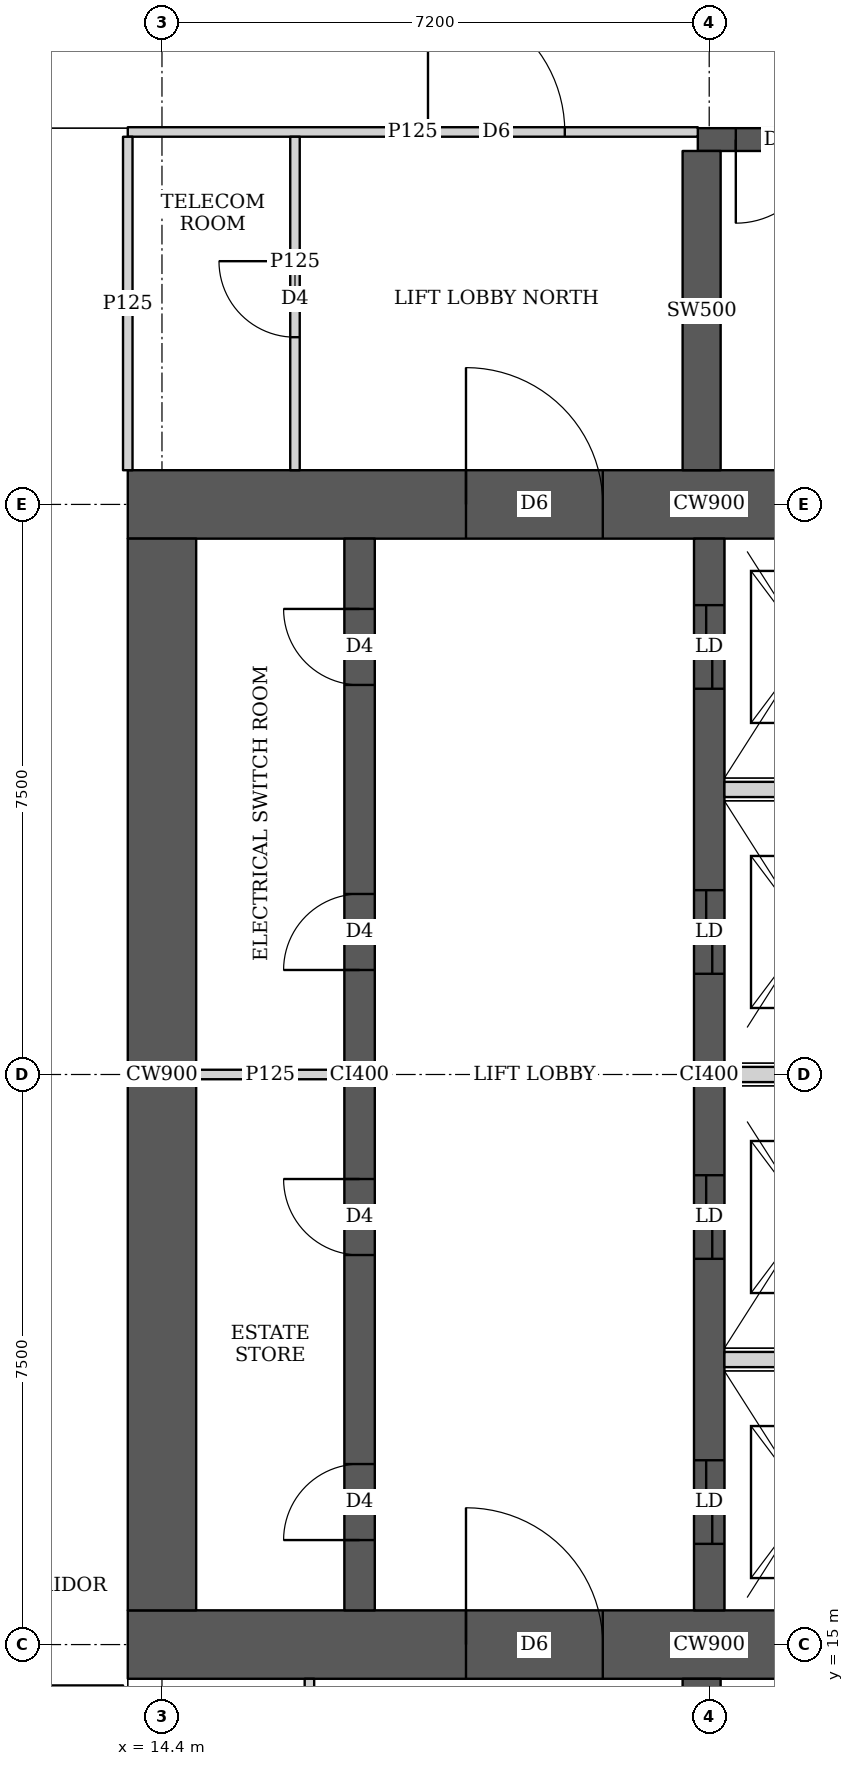
"""IFC4 building model, lengths in metres.
Left out: names, types, materials, properties, quantities, classifications, styles, units other than length and angle.
Written with IfcOpenShell. Run it as: python <this file> out.ifc"""

import sys

from ifc_helpers import new_model, si_unit, direction, frame, frame_2d, origin, place, context, subcontext, project, spatial, rectangle, extrude, element, fill, save


model = new_model("IFC4")
c1 = context("Model", 3, precision=1e-05, world=origin(), true_north=direction((0.0, 1.0)))
c2 = subcontext(c1, "Body", "Model", "MODEL_VIEW")
j1 = project(units=[si_unit("LENGTHUNIT", "METRE"), si_unit("PLANEANGLEUNIT", "RADIAN")], contexts=[c1])
p1 = place(None, origin())
s1 = spatial("IfcSite", under=j1, at=p1, CompositionType="ELEMENT")
p2 = place(p1, origin())
s2 = spatial("IfcBuilding", under=s1, at=p2, CompositionType="ELEMENT")
p3 = place(p2, frame((0.0, 0.0, 169.55)))
s3 = spatial("IfcBuildingStorey", under=s2, at=p3, CompositionType="ELEMENT", Elevation=169.55)
p4 = place(p3, frame((13.95, 15.0, 0.0), z_axis=(0.0, 0.0, 1.0), x_axis=(1.0, 0.0, 0.0)))
e1 = element("IfcWall", 1, at=p4, inside=s3, PredefinedType="SHEAR", context=c2, shape_type="SweptSolid", body=[
    extrude(rectangle(XDim=15.3, YDim=0.9, at=frame_2d((7.65, 0.0))), origin(), (0.0, 0.0, 1.0), 3.75),
])
p5 = place(p4, frame((4.45, 0.0, 0.0)))
e2 = element("IfcOpeningElement", 2, at=p5, cuts=e1, PredefinedType="OPENING", context=c2, shape_type="SweptSolid", body=[
    extrude(rectangle(XDim=1.8, YDim=2.1, at=frame_2d((0.9, 1.05))), frame((0.0, 0.46, 0.0), z_axis=(0.0, -1.0, 0.0), x_axis=(1.0, 0.0, 0.0)), (0.0, 0.0, 1.0), 0.92),
])
p6 = place(p4, frame((10.7, 0.0, 0.0)))
e3 = element("IfcOpeningElement", 3, at=p6, cuts=e1, PredefinedType="OPENING", context=c2, shape_type="SweptSolid", body=[
    extrude(rectangle(XDim=1.1, YDim=2.1, at=frame_2d((0.55, 1.05))), frame((0.0, 0.46, 0.0), z_axis=(0.0, -1.0, 0.0), x_axis=(1.0, 0.0, 0.0)), (0.0, 0.0, 1.0), 0.92),
])
p7 = place(p3, frame((13.95, 30.0, 0.0), z_axis=(0.0, 0.0, 1.0), x_axis=(1.0, 0.0, 0.0)))
e4 = element("IfcWall", 4, at=p7, inside=s3, PredefinedType="SHEAR", context=c2, shape_type="SweptSolid", body=[
    extrude(rectangle(XDim=15.3, YDim=0.9, at=frame_2d((7.65, 0.0))), origin(), (0.0, 0.0, 1.0), 3.75),
])
p8 = place(p7, frame((4.45, 0.0, 0.0)))
e5 = element("IfcOpeningElement", 5, at=p8, cuts=e4, PredefinedType="OPENING", context=c2, shape_type="SweptSolid", body=[
    extrude(rectangle(XDim=1.8, YDim=2.1, at=frame_2d((0.9, 1.05))), frame((0.0, 0.46, 0.0), z_axis=(0.0, -1.0, 0.0), x_axis=(1.0, 0.0, 0.0)), (0.0, 0.0, 1.0), 0.92),
])
p9 = place(p7, frame((10.7, 0.0, 0.0)))
e6 = element("IfcOpeningElement", 6, at=p9, cuts=e4, PredefinedType="OPENING", context=c2, shape_type="SweptSolid", body=[
    extrude(rectangle(XDim=1.1, YDim=2.1, at=frame_2d((0.55, 1.05))), frame((0.0, 0.46, 0.0), z_axis=(0.0, -1.0, 0.0), x_axis=(1.0, 0.0, 0.0)), (0.0, 0.0, 1.0), 0.92),
])
p10 = place(p3, frame((14.4, 15.45, 0.0), z_axis=(0.0, 0.0, 1.0), x_axis=(0.0, 1.0, 0.0)))
e7 = element("IfcWall", 7, at=p10, inside=s3, PredefinedType="SHEAR", context=c2, shape_type="SweptSolid", body=[
    extrude(rectangle(XDim=14.1, YDim=0.9, at=frame_2d((7.05, 0.0))), origin(), (0.0, 0.0, 1.0), 3.75),
])
p11 = place(p3, frame((17.0, 15.45, 0.0), z_axis=(0.0, 0.0, 1.0), x_axis=(0.0, 1.0, 0.0)))
e8 = element("IfcWall", 8, at=p11, inside=s3, PredefinedType="SHEAR", context=c2, shape_type="SweptSolid", body=[
    extrude(rectangle(XDim=14.1, YDim=0.4, at=frame_2d((7.05, 0.0))), origin(), (0.0, 0.0, 1.0), 3.75),
])
p12 = place(p11, frame((0.925, 0.0, 0.0)))
e9 = element("IfcOpeningElement", 9, at=p12, cuts=e8, PredefinedType="OPENING", context=c2, shape_type="SweptSolid", body=[
    extrude(rectangle(XDim=1.0, YDim=2.1, at=frame_2d((0.5, 1.05))), frame((0.0, 0.21, 0.0), z_axis=(0.0, -1.0, 0.0), x_axis=(1.0, 0.0, 0.0)), (0.0, 0.0, 1.0), 0.42),
])
p13 = place(p11, frame((4.675, 0.0, 0.0)))
e10 = element("IfcOpeningElement", 10, at=p13, cuts=e8, PredefinedType="OPENING", context=c2, shape_type="SweptSolid", body=[
    extrude(rectangle(XDim=1.0, YDim=2.1, at=frame_2d((0.5, 1.05))), frame((0.0, 0.21, 0.0), z_axis=(0.0, -1.0, 0.0), x_axis=(1.0, 0.0, 0.0)), (0.0, 0.0, 1.0), 0.42),
])
p14 = place(p11, frame((8.425, 0.0, 0.0)))
e11 = element("IfcOpeningElement", 11, at=p14, cuts=e8, PredefinedType="OPENING", context=c2, shape_type="SweptSolid", body=[
    extrude(rectangle(XDim=1.0, YDim=2.1, at=frame_2d((0.5, 1.05))), frame((0.0, 0.21, 0.0), z_axis=(0.0, -1.0, 0.0), x_axis=(1.0, 0.0, 0.0)), (0.0, 0.0, 1.0), 0.42),
])
p15 = place(p11, frame((12.175, 0.0, 0.0)))
e12 = element("IfcOpeningElement", 12, at=p15, cuts=e8, PredefinedType="OPENING", context=c2, shape_type="SweptSolid", body=[
    extrude(rectangle(XDim=1.0, YDim=2.1, at=frame_2d((0.5, 1.05))), frame((0.0, 0.21, 0.0), z_axis=(0.0, -1.0, 0.0), x_axis=(1.0, 0.0, 0.0)), (0.0, 0.0, 1.0), 0.42),
])
p16 = place(p3, frame((21.6, 15.45, 0.0), z_axis=(0.0, 0.0, 1.0), x_axis=(0.0, 1.0, 0.0)))
e13 = element("IfcWall", 13, at=p16, inside=s3, PredefinedType="SHEAR", context=c2, shape_type="SweptSolid", body=[
    extrude(rectangle(XDim=14.1, YDim=0.4, at=frame_2d((7.05, 0.0))), origin(), (0.0, 0.0, 1.0), 3.75),
])
p17 = place(p16, frame((0.875, 0.0, 0.0)))
e14 = element("IfcOpeningElement", 14, at=p17, cuts=e13, PredefinedType="OPENING", context=c2, shape_type="SweptSolid", body=[
    extrude(rectangle(XDim=1.1, YDim=2.1, at=frame_2d((0.55, 1.05))), frame((0.0, 0.21, 0.0), z_axis=(0.0, -1.0, 0.0), x_axis=(1.0, 0.0, 0.0)), (0.0, 0.0, 1.0), 0.42),
])
p18 = place(p16, frame((4.625, 0.0, 0.0)))
e15 = element("IfcOpeningElement", 15, at=p18, cuts=e13, PredefinedType="OPENING", context=c2, shape_type="SweptSolid", body=[
    extrude(rectangle(XDim=1.1, YDim=2.1, at=frame_2d((0.55, 1.05))), frame((0.0, 0.21, 0.0), z_axis=(0.0, -1.0, 0.0), x_axis=(1.0, 0.0, 0.0)), (0.0, 0.0, 1.0), 0.42),
])
p19 = place(p16, frame((8.375, 0.0, 0.0)))
e16 = element("IfcOpeningElement", 16, at=p19, cuts=e13, PredefinedType="OPENING", context=c2, shape_type="SweptSolid", body=[
    extrude(rectangle(XDim=1.1, YDim=2.1, at=frame_2d((0.55, 1.05))), frame((0.0, 0.21, 0.0), z_axis=(0.0, -1.0, 0.0), x_axis=(1.0, 0.0, 0.0)), (0.0, 0.0, 1.0), 0.42),
])
p20 = place(p16, frame((12.125, 0.0, 0.0)))
e17 = element("IfcOpeningElement", 17, at=p20, cuts=e13, PredefinedType="OPENING", context=c2, shape_type="SweptSolid", body=[
    extrude(rectangle(XDim=1.1, YDim=2.1, at=frame_2d((0.55, 1.05))), frame((0.0, 0.21, 0.0), z_axis=(0.0, -1.0, 0.0), x_axis=(1.0, 0.0, 0.0)), (0.0, 0.0, 1.0), 0.42),
])
p21 = place(p3, frame((21.5, 10.35, 0.0), z_axis=(0.0, 0.0, 1.0), x_axis=(0.0, 1.0, 0.0)))
e18 = element("IfcWall", 18, at=p21, inside=s3, PredefinedType="SHEAR", context=c2, shape_type="SweptSolid", body=[
    extrude(rectangle(XDim=4.2, YDim=0.5, at=frame_2d((2.1, 0.0))), origin(), (0.0, 0.0, 1.0), 3.75),
])
p22 = place(p3, frame((21.45, 34.8, 0.0), z_axis=(0.0, 0.0, 1.0), x_axis=(1.0, 0.0, 0.0)))
e19 = element("IfcWall", 19, at=p22, inside=s3, PredefinedType="SHEAR", context=c2, shape_type="SweptSolid", body=[
    extrude(rectangle(XDim=7.5, YDim=0.3, at=frame_2d((3.75, 0.0))), origin(), (0.0, 0.0, 1.0), 3.75),
])
p23 = place(p22, frame((0.5, 0.0, 0.0)))
e20 = element("IfcOpeningElement", 20, at=p23, cuts=e19, PredefinedType="OPENING", context=c2, shape_type="SweptSolid", body=[
    extrude(rectangle(XDim=1.1, YDim=2.1, at=frame_2d((0.55, 1.05))), frame((0.0, 0.16, 0.0), z_axis=(0.0, -1.0, 0.0), x_axis=(1.0, 0.0, 0.0)), (0.0, 0.0, 1.0), 0.32),
])
p24 = place(p3, frame((21.5, 30.45, 0.0), z_axis=(0.0, 0.0, 1.0), x_axis=(0.0, 1.0, 0.0)))
e21 = element("IfcWall", 21, at=p24, inside=s3, PredefinedType="SHEAR", context=c2, shape_type="SweptSolid", body=[
    extrude(rectangle(XDim=4.2, YDim=0.5, at=frame_2d((2.1, 0.0))), origin(), (0.0, 0.0, 1.0), 3.75),
])
p25 = place(p3, frame((10.162, 14.4, 0.0), z_axis=(0.0, 0.0, 1.0), x_axis=(1.0, 0.0, 0.0)))
e22 = element("IfcWall", 22, at=p25, inside=s3, PredefinedType="PARTITIONING", context=c2, shape_type="SweptSolid", body=[
    extrude(rectangle(XDim=3.726, YDim=0.125, at=frame_2d((1.863, 0.0))), origin(), (0.0, 0.0, 1.0), 3.5),
])
p26 = place(p3, frame((13.95, 30.45, 0.0), z_axis=(0.0, 0.0, 1.0), x_axis=(0.0, 1.0, 0.0)))
e23 = element("IfcWall", 23, at=p26, inside=s3, PredefinedType="PARTITIONING", context=c2, shape_type="SweptSolid", body=[
    extrude(rectangle(XDim=4.387, YDim=0.125, at=frame_2d((2.193, 0.0))), origin(), (0.0, 0.0, 1.0), 3.5),
])
p27 = place(p3, frame((13.95, 34.9, 0.0), z_axis=(0.0, 0.0, 1.0), x_axis=(1.0, 0.0, 0.0)))
e24 = element("IfcWall", 24, at=p27, inside=s3, PredefinedType="PARTITIONING", context=c2, shape_type="SweptSolid", body=[
    extrude(rectangle(XDim=7.5, YDim=0.125, at=frame_2d((3.75, 0.0))), origin(), (0.0, 0.0, 1.0), 3.5),
])
p28 = place(p27, frame((3.95, 0.0, 0.0)))
e25 = element("IfcOpeningElement", 25, at=p28, cuts=e24, PredefinedType="OPENING", context=c2, shape_type="SweptSolid", body=[
    extrude(rectangle(XDim=1.8, YDim=2.1, at=frame_2d((0.9, 1.05))), frame((0.0, 0.073, 0.0), z_axis=(0.0, -1.0, 0.0), x_axis=(1.0, 0.0, 0.0)), (0.0, 0.0, 1.0), 0.145),
])
p29 = place(p3, frame((16.34, 10.163, 0.0), z_axis=(0.0, 0.0, 1.0), x_axis=(0.0, 1.0, 0.0)))
e26 = element("IfcWall", 26, at=p29, inside=s3, PredefinedType="PARTITIONING", context=c2, shape_type="SweptSolid", body=[
    extrude(rectangle(XDim=4.387, YDim=0.125, at=frame_2d((2.193, 0.0))), origin(), (0.0, 0.0, 1.0), 3.5),
])
p30 = place(p29, frame((1.637, 0.0, 0.0)))
e27 = element("IfcOpeningElement", 27, at=p30, cuts=e26, PredefinedType="OPENING", context=c2, shape_type="SweptSolid", body=[
    extrude(rectangle(XDim=1.0, YDim=2.1, at=frame_2d((0.5, 1.05))), frame((0.0, 0.073, 0.0), z_axis=(0.0, -1.0, 0.0), x_axis=(1.0, 0.0, 0.0)), (0.0, 0.0, 1.0), 0.145),
])
p31 = place(p3, frame((16.15, 30.45, 0.0), z_axis=(0.0, 0.0, 1.0), x_axis=(0.0, 1.0, 0.0)))
e28 = element("IfcWall", 28, at=p31, inside=s3, PredefinedType="PARTITIONING", context=c2, shape_type="SweptSolid", body=[
    extrude(rectangle(XDim=4.387, YDim=0.125, at=frame_2d((2.193, 0.0))), origin(), (0.0, 0.0, 1.0), 3.5),
])
p32 = place(p31, frame((1.75, 0.0, 0.0)))
e29 = element("IfcOpeningElement", 29, at=p32, cuts=e28, PredefinedType="OPENING", context=c2, shape_type="SweptSolid", body=[
    extrude(rectangle(XDim=1.0, YDim=2.1, at=frame_2d((0.5, 1.05))), frame((0.0, 0.073, 0.0), z_axis=(0.0, -1.0, 0.0), x_axis=(1.0, 0.0, 0.0)), (0.0, 0.0, 1.0), 0.145),
])
p33 = place(p3, frame((14.85, 22.5, 0.0), z_axis=(0.0, 0.0, 1.0), x_axis=(1.0, 0.0, 0.0)))
e30 = element("IfcWall", 30, at=p33, inside=s3, PredefinedType="PARTITIONING", context=c2, shape_type="SweptSolid", body=[
    extrude(rectangle(XDim=1.95, YDim=0.125, at=frame_2d((0.975, 0.0))), origin(), (0.0, 0.0, 1.0), 3.5),
])
for number, where, z_axis, x_axis in (
    (31, (21.8, 18.75, 0.0), (0.0, 0.0, 1.0), (1.0, 0.0, 0.0)),
    (32, (21.8, 22.5, 0.0), (0.0, 0.0, 1.0), (1.0, 0.0, 0.0)),
    (33, (21.8, 26.25, 0.0), (0.0, 0.0, 1.0), (1.0, 0.0, 0.0)),
):
    element("IfcWall", number, at=place(p3, frame(where, z_axis=z_axis, x_axis=x_axis)), inside=s3, PredefinedType="SOLIDWALL", context=c2, shape_type="SweptSolid", body=[
        extrude(rectangle(XDim=2.2, YDim=0.2, at=frame_2d((1.1, 0.0))), origin(), (0.0, 0.0, 1.0), 3.5),
    ])
p34 = place(p32, origin())
e34 = element("IfcDoor", 34, at=p34, inside=s3, OperationType="SINGLE_SWING_RIGHT", PredefinedType="DOOR", context=c2, shape_type="SweptSolid", body=[
    extrude(rectangle(XDim=1.0, YDim=2.1, at=frame_2d((0.5, 1.05))), frame((0.0, 0.025, 0.0), z_axis=(0.0, -1.0, 0.0), x_axis=(1.0, 0.0, 0.0)), (0.0, 0.0, 1.0), 0.05),
])
fill(e29, e34)
p35 = place(p28, origin())
e35 = element("IfcDoor", 35, at=p35, inside=s3, OperationType="DOUBLE_DOOR_SINGLE_SWING", PredefinedType="DOOR", context=c2, shape_type="SweptSolid", body=[
    extrude(rectangle(XDim=1.8, YDim=2.1, at=frame_2d((0.9, 1.05))), frame((0.0, 0.025, 0.0), z_axis=(0.0, -1.0, 0.0), x_axis=(1.0, 0.0, 0.0)), (0.0, 0.0, 1.0), 0.05),
])
fill(e25, e35)
p36 = place(p12, origin())
e36 = element("IfcDoor", 36, at=p36, inside=s3, OperationType="SINGLE_SWING_LEFT", PredefinedType="DOOR", context=c2, shape_type="SweptSolid", body=[
    extrude(rectangle(XDim=1.0, YDim=2.1, at=frame_2d((0.5, 1.05))), frame((0.0, 0.025, 0.0), z_axis=(0.0, -1.0, 0.0), x_axis=(1.0, 0.0, 0.0)), (0.0, 0.0, 1.0), 0.05),
])
fill(e9, e36)
p37 = place(p13, origin())
e37 = element("IfcDoor", 37, at=p37, inside=s3, OperationType="SINGLE_SWING_RIGHT", PredefinedType="DOOR", context=c2, shape_type="SweptSolid", body=[
    extrude(rectangle(XDim=1.0, YDim=2.1, at=frame_2d((0.5, 1.05))), frame((0.0, 0.025, 0.0), z_axis=(0.0, -1.0, 0.0), x_axis=(1.0, 0.0, 0.0)), (0.0, 0.0, 1.0), 0.05),
])
fill(e10, e37)
p38 = place(p14, origin())
e38 = element("IfcDoor", 38, at=p38, inside=s3, OperationType="SINGLE_SWING_LEFT", PredefinedType="DOOR", context=c2, shape_type="SweptSolid", body=[
    extrude(rectangle(XDim=1.0, YDim=2.1, at=frame_2d((0.5, 1.05))), frame((0.0, 0.025, 0.0), z_axis=(0.0, -1.0, 0.0), x_axis=(1.0, 0.0, 0.0)), (0.0, 0.0, 1.0), 0.05),
])
fill(e11, e38)
p39 = place(p15, origin())
e39 = element("IfcDoor", 39, at=p39, inside=s3, OperationType="SINGLE_SWING_RIGHT", PredefinedType="DOOR", context=c2, shape_type="SweptSolid", body=[
    extrude(rectangle(XDim=1.0, YDim=2.1, at=frame_2d((0.5, 1.05))), frame((0.0, 0.025, 0.0), z_axis=(0.0, -1.0, 0.0), x_axis=(1.0, 0.0, 0.0)), (0.0, 0.0, 1.0), 0.05),
])
fill(e12, e39)
p40 = place(p5, origin())
e40 = element("IfcDoor", 40, at=p40, inside=s3, OperationType="DOUBLE_DOOR_SINGLE_SWING", PredefinedType="DOOR", context=c2, shape_type="SweptSolid", body=[
    extrude(rectangle(XDim=1.8, YDim=2.1, at=frame_2d((0.9, 1.05))), frame((0.0, 0.025, 0.0), z_axis=(0.0, -1.0, 0.0), x_axis=(1.0, 0.0, 0.0)), (0.0, 0.0, 1.0), 0.05),
])
fill(e2, e40)
p41 = place(p8, origin())
e41 = element("IfcDoor", 41, at=p41, inside=s3, OperationType="DOUBLE_DOOR_SINGLE_SWING", PredefinedType="DOOR", context=c2, shape_type="SweptSolid", body=[
    extrude(rectangle(XDim=1.8, YDim=2.1, at=frame_2d((0.9, 1.05))), frame((0.0, 0.025, 0.0), z_axis=(0.0, -1.0, 0.0), x_axis=(1.0, 0.0, 0.0)), (0.0, 0.0, 1.0), 0.05),
])
fill(e5, e41)
p42 = place(p17, origin())
e42 = element("IfcDoor", 42, at=p42, inside=s3, OperationType="DOUBLE_DOOR_SLIDING", PredefinedType="DOOR", context=c2, shape_type="SweptSolid", body=[
    extrude(rectangle(XDim=1.1, YDim=2.1, at=frame_2d((0.55, 1.05))), frame((0.0, 0.025, 0.0), z_axis=(0.0, -1.0, 0.0), x_axis=(1.0, 0.0, 0.0)), (0.0, 0.0, 1.0), 0.05),
])
fill(e14, e42)
p43 = place(p18, origin())
e43 = element("IfcDoor", 43, at=p43, inside=s3, OperationType="DOUBLE_DOOR_SLIDING", PredefinedType="DOOR", context=c2, shape_type="SweptSolid", body=[
    extrude(rectangle(XDim=1.1, YDim=2.1, at=frame_2d((0.55, 1.05))), frame((0.0, 0.025, 0.0), z_axis=(0.0, -1.0, 0.0), x_axis=(1.0, 0.0, 0.0)), (0.0, 0.0, 1.0), 0.05),
])
fill(e15, e43)
p44 = place(p19, origin())
e44 = element("IfcDoor", 44, at=p44, inside=s3, OperationType="DOUBLE_DOOR_SLIDING", PredefinedType="DOOR", context=c2, shape_type="SweptSolid", body=[
    extrude(rectangle(XDim=1.1, YDim=2.1, at=frame_2d((0.55, 1.05))), frame((0.0, 0.025, 0.0), z_axis=(0.0, -1.0, 0.0), x_axis=(1.0, 0.0, 0.0)), (0.0, 0.0, 1.0), 0.05),
])
fill(e16, e44)
p45 = place(p20, origin())
e45 = element("IfcDoor", 45, at=p45, inside=s3, OperationType="DOUBLE_DOOR_SLIDING", PredefinedType="DOOR", context=c2, shape_type="SweptSolid", body=[
    extrude(rectangle(XDim=1.1, YDim=2.1, at=frame_2d((0.55, 1.05))), frame((0.0, 0.025, 0.0), z_axis=(0.0, -1.0, 0.0), x_axis=(1.0, 0.0, 0.0)), (0.0, 0.0, 1.0), 0.05),
])
fill(e17, e45)
p46 = place(p23, origin())
e46 = element("IfcDoor", 46, at=p46, inside=s3, OperationType="SINGLE_SWING_RIGHT", PredefinedType="DOOR", context=c2, shape_type="SweptSolid", body=[
    extrude(rectangle(XDim=1.1, YDim=2.1, at=frame_2d((0.55, 1.05))), frame((0.0, 0.025, 0.0), z_axis=(0.0, -1.0, 0.0), x_axis=(1.0, 0.0, 0.0)), (0.0, 0.0, 1.0), 0.05),
])
fill(e20, e46)
save(model, sys.argv[1])
